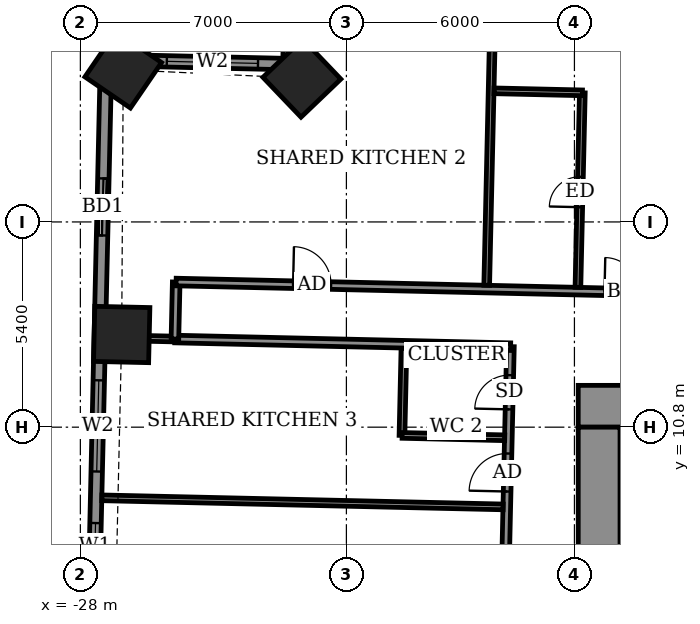
"""IFC4 building model, lengths in metres.
Left out: names, types, materials, properties, quantities, classifications, styles, units other than length and angle.
Written with IfcOpenShell. Run it as: python <this file> out.ifc"""

import sys

from ifc_helpers import new_model, si_unit, direction, frame, frame_2d, origin, origin_2d, place, context, subcontext, project, spatial, rectangle, extrude, element, fill, save


model = new_model("IFC4")
c1 = context("Model", 3, precision=1e-05, world=origin(), true_north=direction((0.0, 1.0)))
c2 = subcontext(c1, "Body", "Model", "MODEL_VIEW")
j1 = project(units=[si_unit("LENGTHUNIT", "METRE"), si_unit("PLANEANGLEUNIT", "RADIAN")], contexts=[c1])
p1 = place(None, origin())
s1 = spatial("IfcSite", under=j1, at=p1, CompositionType="ELEMENT")
p2 = place(p1, origin())
s2 = spatial("IfcBuilding", under=s1, at=p2, CompositionType="ELEMENT")
p3 = place(p2, frame((0.0, 0.0, 67.5)))
s3 = spatial("IfcBuildingStorey", under=s2, at=p3, CompositionType="ELEMENT", Elevation=67.5)
for number, where, z_axis, x_axis in (
    (1, (-22.171, 19.982, -0.55), (0.0, 0.0, 1.0), (-0.723, -0.691, 0.0)),
    (2, (-26.872, 20.205, -0.55), (0.0, 0.0, 1.0), (-0.565, -0.825, 0.0)),
    (3, (-26.912, 13.239, -0.55), (0.0, 0.0, 1.0), (-0.023, -1.0, 0.0)),
):
    element("IfcColumn", number, at=place(p3, frame(where, z_axis=z_axis, x_axis=x_axis)), inside=s3, PredefinedType="COLUMN", context=c2, shape_type="SweptSolid", body=[
        extrude(rectangle(XDim=1.45, YDim=1.45, at=origin_2d()), origin(), (0.0, 0.0, 1.0), 3.6),
    ])
p4 = place(p3, frame((-22.416, 25.152, 0.0), z_axis=(0.0, 0.0, 1.0), x_axis=(-0.022683280499, -0.999742701292, 0.0)))
e4 = element("IfcWall", 4, at=p4, inside=s3, PredefinedType="SOLIDWALL", context=c2, shape_type="SweptSolid", body=[
    extrude(rectangle(XDim=4.8, YDim=0.3, at=frame_2d((2.4, 0.0))), origin(), (0.0, 0.0, 1.0), 2.55),
])
p5 = place(p4, frame((1.598, 0.0, 0.9)))
e5 = element("IfcOpeningElement", 5, at=p5, cuts=e4, PredefinedType="OPENING", context=c2, shape_type="SweptSolid", body=[
    extrude(rectangle(XDim=2.4, YDim=1.5, at=frame_2d((1.2, 0.75))), frame((0.0, 0.16, 0.0), z_axis=(0.0, -1.0, 0.0), x_axis=(1.0, 0.0, 0.0)), (0.0, 0.0, 1.0), 0.32),
])
p6 = place(p3, frame((-22.525, 20.353, 0.0), z_axis=(0.0, 0.0, 1.0), x_axis=(-0.999742701292, 0.022683280499, 0.0)))
e6 = element("IfcWall", 6, at=p6, inside=s3, PredefinedType="SOLIDWALL", context=c2, shape_type="SweptSolid", body=[
    extrude(rectangle(XDim=4.8, YDim=0.3, at=frame_2d((2.4, 0.0))), origin(), (0.0, 0.0, 1.0), 2.55),
])
p7 = place(p6, frame((0.801, 0.0, 0.9)))
e7 = element("IfcOpeningElement", 7, at=p7, cuts=e6, PredefinedType="OPENING", context=c2, shape_type="SweptSolid", body=[
    extrude(rectangle(XDim=2.4, YDim=1.5, at=frame_2d((1.2, 0.75))), frame((0.0, 0.16, 0.0), z_axis=(0.0, -1.0, 0.0), x_axis=(1.0, 0.0, 0.0)), (0.0, 0.0, 1.0), 0.32),
])
p8 = place(p3, frame((-27.324, 20.462, 0.0), z_axis=(0.0, 0.0, 1.0), x_axis=(-0.022695628174, -0.999742421057, 0.0)))
e8 = element("IfcWall", 8, at=p8, inside=s3, PredefinedType="SOLIDWALL", context=c2, shape_type="SweptSolid", body=[
    extrude(rectangle(XDim=14.63, YDim=0.3, at=frame_2d((7.315, 0.0))), origin(), (0.0, 0.0, 1.0), 3.05),
])
p9 = place(p8, frame((3.118, 0.0, 0.0)))
e9 = element("IfcOpeningElement", 9, at=p9, cuts=e8, PredefinedType="OPENING", context=c2, shape_type="SweptSolid", body=[
    extrude(rectangle(XDim=1.5, YDim=2.4, at=frame_2d((0.75, 1.2))), frame((0.0, 0.16, 0.0), z_axis=(0.0, -1.0, 0.0), x_axis=(1.0, 0.0, 0.0)), (0.0, 0.0, 1.0), 0.32),
])
p10 = place(p8, frame((8.431, 0.0, 0.9)))
e10 = element("IfcOpeningElement", 10, at=p10, cuts=e8, PredefinedType="OPENING", context=c2, shape_type="SweptSolid", body=[
    extrude(rectangle(XDim=2.4, YDim=1.5, at=frame_2d((1.2, 0.75))), frame((0.0, 0.16, 0.0), z_axis=(0.0, -1.0, 0.0), x_axis=(1.0, 0.0, 0.0)), (0.0, 0.0, 1.0), 0.32),
])
p11 = place(p8, frame((12.188, 0.0, 0.9)))
e11 = element("IfcOpeningElement", 11, at=p11, cuts=e8, PredefinedType="OPENING", context=c2, shape_type="SweptSolid", body=[
    extrude(rectangle(XDim=1.2, YDim=1.5, at=frame_2d((0.6, 0.75))), frame((0.0, 0.16, 0.0), z_axis=(0.0, -1.0, 0.0), x_axis=(1.0, 0.0, 0.0)), (0.0, 0.0, 1.0), 0.32),
])
p12 = place(p3, frame((-17.287, -13.625, 0.0), z_axis=(0.0, 0.0, 1.0), x_axis=(0.022712214871, 0.999742044377, 0.0)))
e12 = element("IfcWall", 12, at=p12, inside=s3, PredefinedType="PARTITIONING", context=c2, shape_type="SweptSolid", body=[
    extrude(rectangle(XDim=26.551, YDim=0.2, at=frame_2d((13.275, 0.0))), origin(), (0.0, 0.0, 1.0), 3.05),
])
p13 = place(p12, frame((22.738, 0.0, 0.0)))
e13 = element("IfcOpeningElement", 13, at=p13, cuts=e12, PredefinedType="OPENING", context=c2, shape_type="SweptSolid", body=[
    extrude(rectangle(XDim=1.0, YDim=2.1, at=frame_2d((0.5, 1.05))), frame((0.0, 0.11, 0.0), z_axis=(0.0, -1.0, 0.0), x_axis=(1.0, 0.0, 0.0)), (0.0, 0.0, 1.0), 0.22),
])
p14 = place(p12, frame((24.9, 0.0, 0.0)))
e14 = element("IfcOpeningElement", 14, at=p14, cuts=e12, PredefinedType="OPENING", context=c2, shape_type="SweptSolid", body=[
    extrude(rectangle(XDim=0.9, YDim=2.1, at=frame_2d((0.45, 1.05))), frame((0.0, 0.11, 0.0), z_axis=(0.0, -1.0, 0.0), x_axis=(1.0, 0.0, 0.0)), (0.0, 0.0, 1.0), 0.22),
])
p15 = place(p12, frame((20.3, 0.0, 0.0)))
e15 = element("IfcOpeningElement", 15, at=p15, cuts=e12, PredefinedType="OPENING", context=c2, shape_type="SweptSolid", body=[
    extrude(rectangle(XDim=1.0, YDim=2.1, at=frame_2d((0.5, 1.05))), frame((0.0, 0.11, 0.0), z_axis=(0.0, -1.0, 0.0), x_axis=(1.0, 0.0, 0.0)), (0.0, 0.0, 1.0), 0.22),
])
p16 = place(p12, frame((15.025, 0.0, 0.0)))
e16 = element("IfcOpeningElement", 16, at=p16, cuts=e12, PredefinedType="OPENING", context=c2, shape_type="SweptSolid", body=[
    extrude(rectangle(XDim=1.0, YDim=2.1, at=frame_2d((0.5, 1.05))), frame((0.0, 0.11, 0.0), z_axis=(0.0, -1.0, 0.0), x_axis=(1.0, 0.0, 0.0)), (0.0, 0.0, 1.0), 0.22),
])
p17 = place(p12, frame((17.525, 0.0, 0.0)))
e17 = element("IfcOpeningElement", 17, at=p17, cuts=e12, PredefinedType="OPENING", context=c2, shape_type="SweptSolid", body=[
    extrude(rectangle(XDim=0.9, YDim=2.1, at=frame_2d((0.45, 1.05))), frame((0.0, 0.11, 0.0), z_axis=(0.0, -1.0, 0.0), x_axis=(1.0, 0.0, 0.0)), (0.0, 0.0, 1.0), 0.22),
])
p18 = place(p12, frame((11.678, 0.0, 0.0)))
e18 = element("IfcOpeningElement", 18, at=p18, cuts=e12, PredefinedType="OPENING", context=c2, shape_type="SweptSolid", body=[
    extrude(rectangle(XDim=1.0, YDim=2.1, at=frame_2d((0.5, 1.05))), frame((0.0, 0.11, 0.0), z_axis=(0.0, -1.0, 0.0), x_axis=(1.0, 0.0, 0.0)), (0.0, 0.0, 1.0), 0.22),
])
p19 = place(p12, frame((8.45, 0.0, 0.0)))
e19 = element("IfcOpeningElement", 19, at=p19, cuts=e12, PredefinedType="OPENING", context=c2, shape_type="SweptSolid", body=[
    extrude(rectangle(XDim=1.0, YDim=2.1, at=frame_2d((0.5, 1.05))), frame((0.0, 0.11, 0.0), z_axis=(0.0, -1.0, 0.0), x_axis=(1.0, 0.0, 0.0)), (0.0, 0.0, 1.0), 0.22),
])
p20 = place(p12, frame((6.275, 0.0, 0.0)))
e20 = element("IfcOpeningElement", 20, at=p20, cuts=e12, PredefinedType="OPENING", context=c2, shape_type="SweptSolid", body=[
    extrude(rectangle(XDim=0.9, YDim=2.1, at=frame_2d((0.45, 1.05))), frame((0.0, 0.11, 0.0), z_axis=(0.0, -1.0, 0.0), x_axis=(1.0, 0.0, 0.0)), (0.0, 0.0, 1.0), 0.22),
])
p21 = place(p12, frame((1.062, 0.0, 0.0)))
e21 = element("IfcOpeningElement", 21, at=p21, cuts=e12, PredefinedType="OPENING", context=c2, shape_type="SweptSolid", body=[
    extrude(rectangle(XDim=1.0, YDim=2.1, at=frame_2d((0.5, 1.05))), frame((0.0, 0.11, 0.0), z_axis=(0.0, -1.0, 0.0), x_axis=(1.0, 0.0, 0.0)), (0.0, 0.0, 1.0), 0.22),
])
p22 = place(p12, frame((3.875, 0.0, 0.0)))
e22 = element("IfcOpeningElement", 22, at=p22, cuts=e12, PredefinedType="OPENING", context=c2, shape_type="SweptSolid", body=[
    extrude(rectangle(XDim=0.9, YDim=2.1, at=frame_2d((0.45, 1.05))), frame((0.0, 0.11, 0.0), z_axis=(0.0, -1.0, 0.0), x_axis=(1.0, 0.0, 0.0)), (0.0, 0.0, 1.0), 0.22),
])
p23 = place(p3, frame((-27.435, 8.941, 0.0), z_axis=(0.0, 0.0, 1.0), x_axis=(0.999743955169, -0.022627949603, 0.0)))
e23 = element("IfcWall", 23, at=p23, inside=s3, PredefinedType="PARTITIONING", context=c2, shape_type="SweptSolid", body=[
    extrude(rectangle(XDim=10.563, YDim=0.15, at=frame_2d((5.281, 0.0))), origin(), (0.0, 0.0, 1.0), 2.55),
])
p24 = place(p3, frame((-19.538, 10.583, 0.0), z_axis=(0.0, 0.0, 1.0), x_axis=(0.022612884682, 0.999744296031, 0.0)))
e24 = element("IfcWall", 24, at=p24, inside=s3, PredefinedType="PARTITIONING", context=c2, shape_type="SweptSolid", body=[
    extrude(rectangle(XDim=2.3, YDim=0.15, at=frame_2d((1.15, 0.0))), origin(), (0.0, 0.0, 1.0), 3.05),
])
p25 = place(p3, frame((-19.533, 10.583, 0.0), z_axis=(0.0, 0.0, 1.0), x_axis=(0.999736155505, -0.022969966847, 0.0)))
e25 = element("IfcWall", 25, at=p25, inside=s3, PredefinedType="PARTITIONING", context=c2, shape_type="SweptSolid", body=[
    extrude(rectangle(XDim=2.7, YDim=0.15, at=frame_2d((1.35, 0.0))), origin(), (0.0, 0.0, 1.0), 3.05),
])
p26 = place(p3, frame((-27.34, 13.16, 0.0), z_axis=(0.0, 0.0, 1.0), x_axis=(0.999748678707, -0.022418283238, 0.0)))
e26 = element("IfcWall", 26, at=p26, inside=s3, PredefinedType="PARTITIONING", context=c2, shape_type="SweptSolid", body=[
    extrude(rectangle(XDim=1.83, YDim=0.15, at=frame_2d((0.915, 0.0))), origin(), (0.0, 0.0, 1.0), 3.05),
])
p27 = place(p3, frame((-25.515, 13.119, 0.0), z_axis=(0.0, 0.0, 1.0), x_axis=(0.999741550249, -0.022733954903, 0.0)))
e27 = element("IfcWall", 27, at=p27, inside=s3, PredefinedType="PARTITIONING", context=c2, shape_type="SweptSolid", body=[
    extrude(rectangle(XDim=8.838, YDim=0.2, at=frame_2d((4.419, 0.0))), origin(), (0.0, 0.0, 1.0), 3.05),
])
p28 = place(p3, frame((-25.512, 13.119, 0.0), z_axis=(0.0, 0.0, 1.0), x_axis=(0.022617910375, 0.999744182344, 0.0)))
e28 = element("IfcWall", 28, at=p28, inside=s3, PredefinedType="PARTITIONING", context=c2, shape_type="SweptSolid", body=[
    extrude(rectangle(XDim=1.5, YDim=0.2, at=frame_2d((0.75, 0.0))), origin(), (0.0, 0.0, 1.0), 3.05),
])
p29 = place(p3, frame((-25.481, 14.619, 0.0), z_axis=(0.0, 0.0, 1.0), x_axis=(0.999742349682, -0.022698772048, 0.0)))
e29 = element("IfcWall", 29, at=p29, inside=s3, PredefinedType="PARTITIONING", context=c2, shape_type="SweptSolid", body=[
    extrude(rectangle(XDim=54.886, YDim=0.2, at=frame_2d((27.443, 0.0))), origin(), (0.0, 0.0, 1.0), 3.05),
])
p30 = place(p29, frame((52.093, 0.0, 0.0)))
e30 = element("IfcOpeningElement", 30, at=p30, cuts=e29, PredefinedType="OPENING", context=c2, shape_type="SweptSolid", body=[
    extrude(rectangle(XDim=1.0, YDim=2.1, at=frame_2d((0.5, 1.05))), frame((0.0, 0.11, 0.0), z_axis=(0.0, -1.0, 0.0), x_axis=(1.0, 0.0, 0.0)), (0.0, 0.0, 1.0), 0.22),
])
p31 = place(p29, frame((46.325, 0.0, 0.0)))
e31 = element("IfcOpeningElement", 31, at=p31, cuts=e29, PredefinedType="OPENING", context=c2, shape_type="SweptSolid", body=[
    extrude(rectangle(XDim=0.9, YDim=2.1, at=frame_2d((0.45, 1.05))), frame((0.0, 0.11, 0.0), z_axis=(0.0, -1.0, 0.0), x_axis=(1.0, 0.0, 0.0)), (0.0, 0.0, 1.0), 0.22),
])
p32 = place(p29, frame((41.275, 0.0, 0.0)))
e32 = element("IfcOpeningElement", 32, at=p32, cuts=e29, PredefinedType="OPENING", context=c2, shape_type="SweptSolid", body=[
    extrude(rectangle(XDim=0.9, YDim=2.1, at=frame_2d((0.45, 1.05))), frame((0.0, 0.11, 0.0), z_axis=(0.0, -1.0, 0.0), x_axis=(1.0, 0.0, 0.0)), (0.0, 0.0, 1.0), 0.22),
])
p33 = place(p29, frame((38.875, 0.0, 0.0)))
e33 = element("IfcOpeningElement", 33, at=p33, cuts=e29, PredefinedType="OPENING", context=c2, shape_type="SweptSolid", body=[
    extrude(rectangle(XDim=0.9, YDim=2.1, at=frame_2d((0.45, 1.05))), frame((0.0, 0.11, 0.0), z_axis=(0.0, -1.0, 0.0), x_axis=(1.0, 0.0, 0.0)), (0.0, 0.0, 1.0), 0.22),
])
p34 = place(p29, frame((31.95, 0.0, 0.0)))
e34 = element("IfcOpeningElement", 34, at=p34, cuts=e29, PredefinedType="OPENING", context=c2, shape_type="SweptSolid", body=[
    extrude(rectangle(XDim=0.9, YDim=2.1, at=frame_2d((0.45, 1.05))), frame((0.0, 0.11, 0.0), z_axis=(0.0, -1.0, 0.0), x_axis=(1.0, 0.0, 0.0)), (0.0, 0.0, 1.0), 0.22),
])
p35 = place(p29, frame((29.8, 0.0, 0.0)))
e35 = element("IfcOpeningElement", 35, at=p35, cuts=e29, PredefinedType="OPENING", context=c2, shape_type="SweptSolid", body=[
    extrude(rectangle(XDim=0.9, YDim=2.1, at=frame_2d((0.45, 1.05))), frame((0.0, 0.11, 0.0), z_axis=(0.0, -1.0, 0.0), x_axis=(1.0, 0.0, 0.0)), (0.0, 0.0, 1.0), 0.22),
])
p36 = place(p29, frame((22.875, 0.0, 0.0)))
e36 = element("IfcOpeningElement", 36, at=p36, cuts=e29, PredefinedType="OPENING", context=c2, shape_type="SweptSolid", body=[
    extrude(rectangle(XDim=0.9, YDim=2.1, at=frame_2d((0.45, 1.05))), frame((0.0, 0.11, 0.0), z_axis=(0.0, -1.0, 0.0), x_axis=(1.0, 0.0, 0.0)), (0.0, 0.0, 1.0), 0.22),
])
p37 = place(p29, frame((20.675, 0.0, 0.0)))
e37 = element("IfcOpeningElement", 37, at=p37, cuts=e29, PredefinedType="OPENING", context=c2, shape_type="SweptSolid", body=[
    extrude(rectangle(XDim=0.9, YDim=2.1, at=frame_2d((0.45, 1.05))), frame((0.0, 0.11, 0.0), z_axis=(0.0, -1.0, 0.0), x_axis=(1.0, 0.0, 0.0)), (0.0, 0.0, 1.0), 0.22),
])
p38 = place(p29, frame((13.525, 0.0, 0.0)))
e38 = element("IfcOpeningElement", 38, at=p38, cuts=e29, PredefinedType="OPENING", context=c2, shape_type="SweptSolid", body=[
    extrude(rectangle(XDim=0.9, YDim=2.1, at=frame_2d((0.45, 1.05))), frame((0.0, 0.11, 0.0), z_axis=(0.0, -1.0, 0.0), x_axis=(1.0, 0.0, 0.0)), (0.0, 0.0, 1.0), 0.22),
])
p39 = place(p29, frame((11.275, 0.0, 0.0)))
e39 = element("IfcOpeningElement", 39, at=p39, cuts=e29, PredefinedType="OPENING", context=c2, shape_type="SweptSolid", body=[
    extrude(rectangle(XDim=0.9, YDim=2.1, at=frame_2d((0.45, 1.05))), frame((0.0, 0.11, 0.0), z_axis=(0.0, -1.0, 0.0), x_axis=(1.0, 0.0, 0.0)), (0.0, 0.0, 1.0), 0.22),
])
p40 = place(p29, frame((3.079, 0.0, 0.0)))
e40 = element("IfcOpeningElement", 40, at=p40, cuts=e29, PredefinedType="OPENING", context=c2, shape_type="SweptSolid", body=[
    extrude(rectangle(XDim=1.0, YDim=2.1, at=frame_2d((0.5, 1.05))), frame((0.0, 0.11, 0.0), z_axis=(0.0, -1.0, 0.0), x_axis=(1.0, 0.0, 0.0)), (0.0, 0.0, 1.0), 0.22),
])
p41 = place(p3, frame((-17.308, 14.533, 0.0), z_axis=(0.0, 0.0, 1.0), x_axis=(0.022713904397, 0.999742005993, 0.0)))
e41 = element("IfcWall", 41, at=p41, inside=s3, PredefinedType="PARTITIONING", context=c2, shape_type="SweptSolid", body=[
    extrude(rectangle(XDim=10.351, YDim=0.15, at=frame_2d((5.175, 0.0))), origin(), (0.0, 0.0, 1.0), 2.55),
])
p42 = place(p3, frame((-14.908, 14.479, 0.0), z_axis=(0.0, 0.0, 1.0), x_axis=(0.02265315592, 0.999743384338, 0.0)))
e42 = element("IfcWall", 42, at=p42, inside=s3, PredefinedType="PARTITIONING", context=c2, shape_type="SweptSolid", body=[
    extrude(rectangle(XDim=5.119, YDim=0.15, at=frame_2d((2.56, 0.0))), origin(), (0.0, 0.0, 1.0), 3.05),
])
p43 = place(p42, frame((2.11, 0.0, 0.0)))
e43 = element("IfcOpeningElement", 43, at=p43, cuts=e42, PredefinedType="OPENING", context=c2, shape_type="SweptSolid", body=[
    extrude(rectangle(XDim=0.8, YDim=2.1, at=frame_2d((0.4, 1.05))), frame((0.0, 0.085, 0.0), z_axis=(0.0, -1.0, 0.0), x_axis=(1.0, 0.0, 0.0)), (0.0, 0.0, 1.0), 0.17),
])
p44 = place(p3, frame((-17.115, 19.65, 0.0), z_axis=(0.0, 0.0, 1.0), x_axis=(0.999740478815, -0.022781023197, 0.0)))
e44 = element("IfcWall", 44, at=p44, inside=s3, PredefinedType="PARTITIONING", context=c2, shape_type="SweptSolid", body=[
    extrude(rectangle(XDim=2.325, YDim=0.15, at=frame_2d((1.163, 0.0))), origin(), (0.0, 0.0, 1.0), 3.05),
])
p45 = place(p3, frame((-14.9, 11.35, 0.0), z_axis=(0.0, 0.0, 1.0), x_axis=(1.0, 0.0, 0.0)))
e45 = element("IfcWall", 45, at=p45, inside=s3, PredefinedType="SHEAR", context=c2, shape_type="SweptSolid", body=[
    extrude(rectangle(XDim=29.8, YDim=1.1, at=frame_2d((14.9, 0.0))), origin(), (0.0, 0.0, 1.0), 3.6),
])
p46 = place(p3, frame((-14.35, -10.8, 0.0), z_axis=(0.0, 0.0, 1.0), x_axis=(0.0, 1.0, 0.0)))
e46 = element("IfcWall", 46, at=p46, inside=s3, PredefinedType="SHEAR", context=c2, shape_type="SweptSolid", body=[
    extrude(rectangle(XDim=21.6, YDim=1.1, at=frame_2d((10.8, 0.0))), origin(), (0.0, 0.0, 1.0), 3.6),
])
p47 = place(p46, frame((8.25, 0.0, 0.0)))
e47 = element("IfcOpeningElement", 47, at=p47, cuts=e46, PredefinedType="OPENING", context=c2, shape_type="SweptSolid", body=[
    extrude(rectangle(XDim=1.2, YDim=2.1, at=frame_2d((0.6, 1.05))), frame((0.0, 0.56, 0.0), z_axis=(0.0, -1.0, 0.0), x_axis=(1.0, 0.0, 0.0)), (0.0, 0.0, 1.0), 1.12),
])
p48 = place(p46, frame((15.25, 0.0, 0.0)))
e48 = element("IfcOpeningElement", 48, at=p48, cuts=e46, PredefinedType="OPENING", context=c2, shape_type="SweptSolid", body=[
    extrude(rectangle(XDim=1.2, YDim=2.1, at=frame_2d((0.6, 1.05))), frame((0.0, 0.56, 0.0), z_axis=(0.0, -1.0, 0.0), x_axis=(1.0, 0.0, 0.0)), (0.0, 0.0, 1.0), 1.12),
])
p49 = place(p7, origin())
e49 = element("IfcWindow", 49, at=p49, inside=s3, PartitioningType="DOUBLE_PANEL_VERTICAL", PredefinedType="WINDOW", context=c2, shape_type="SweptSolid", body=[
    extrude(rectangle(XDim=2.4, YDim=1.5, at=frame_2d((1.2, 0.75))), frame((0.0, 0.03, 0.0), z_axis=(0.0, -1.0, 0.0), x_axis=(1.0, 0.0, 0.0)), (0.0, 0.0, 1.0), 0.06),
])
fill(e7, e49)
p50 = place(p9, origin())
e50 = element("IfcDoor", 50, at=p50, inside=s3, OperationType="SLIDING_TO_LEFT", PredefinedType="DOOR", context=c2, shape_type="SweptSolid", body=[
    extrude(rectangle(XDim=1.5, YDim=2.4, at=frame_2d((0.75, 1.2))), frame((0.0, 0.025, 0.0), z_axis=(0.0, -1.0, 0.0), x_axis=(1.0, 0.0, 0.0)), (0.0, 0.0, 1.0), 0.05),
])
fill(e9, e50)
p51 = place(p10, origin())
e51 = element("IfcWindow", 51, at=p51, inside=s3, PartitioningType="DOUBLE_PANEL_VERTICAL", PredefinedType="WINDOW", context=c2, shape_type="SweptSolid", body=[
    extrude(rectangle(XDim=2.4, YDim=1.5, at=frame_2d((1.2, 0.75))), frame((0.0, 0.03, 0.0), z_axis=(0.0, -1.0, 0.0), x_axis=(1.0, 0.0, 0.0)), (0.0, 0.0, 1.0), 0.06),
])
fill(e10, e51)
p52 = place(p11, origin())
e52 = element("IfcWindow", 52, at=p52, inside=s3, PartitioningType="SINGLE_PANEL", PredefinedType="WINDOW", context=c2, shape_type="SweptSolid", body=[
    extrude(rectangle(XDim=1.2, YDim=1.5, at=frame_2d((0.6, 0.75))), frame((0.0, 0.03, 0.0), z_axis=(0.0, -1.0, 0.0), x_axis=(1.0, 0.0, 0.0)), (0.0, 0.0, 1.0), 0.06),
])
fill(e11, e52)
p53 = place(p39, origin())
e53 = element("IfcDoor", 53, at=p53, inside=s3, OperationType="SINGLE_SWING_LEFT", PredefinedType="DOOR", context=c2, shape_type="SweptSolid", body=[
    extrude(rectangle(XDim=0.9, YDim=2.1, at=frame_2d((0.45, 1.05))), frame((0.0, 0.025, 0.0), z_axis=(0.0, -1.0, 0.0), x_axis=(1.0, 0.0, 0.0)), (0.0, 0.0, 1.0), 0.05),
])
fill(e39, e53)
p54 = place(p43, origin())
e54 = element("IfcDoor", 54, at=p54, inside=s3, OperationType="SINGLE_SWING_LEFT", PredefinedType="DOOR", context=c2, shape_type="SweptSolid", body=[
    extrude(rectangle(XDim=0.8, YDim=2.1, at=frame_2d((0.4, 1.05))), frame((0.0, 0.025, 0.0), z_axis=(0.0, -1.0, 0.0), x_axis=(1.0, 0.0, 0.0)), (0.0, 0.0, 1.0), 0.05),
])
fill(e43, e54)
p55 = place(p40, origin())
e55 = element("IfcDoor", 55, at=p55, inside=s3, OperationType="SINGLE_SWING_RIGHT", PredefinedType="DOOR", context=c2, shape_type="SweptSolid", body=[
    extrude(rectangle(XDim=1.0, YDim=2.1, at=frame_2d((0.5, 1.05))), frame((0.0, 0.025, 0.0), z_axis=(0.0, -1.0, 0.0), x_axis=(1.0, 0.0, 0.0)), (0.0, 0.0, 1.0), 0.05),
])
fill(e40, e55)
p56 = place(p13, origin())
e56 = element("IfcDoor", 56, at=p56, inside=s3, OperationType="SINGLE_SWING_LEFT", PredefinedType="DOOR", context=c2, shape_type="SweptSolid", body=[
    extrude(rectangle(XDim=1.0, YDim=2.1, at=frame_2d((0.5, 1.05))), frame((0.0, 0.025, 0.0), z_axis=(0.0, -1.0, 0.0), x_axis=(1.0, 0.0, 0.0)), (0.0, 0.0, 1.0), 0.05),
])
fill(e13, e56)
p57 = place(p14, origin())
e57 = element("IfcDoor", 57, at=p57, inside=s3, OperationType="SINGLE_SWING_LEFT", PredefinedType="DOOR", context=c2, shape_type="SweptSolid", body=[
    extrude(rectangle(XDim=0.9, YDim=2.1, at=frame_2d((0.45, 1.05))), frame((0.0, 0.025, 0.0), z_axis=(0.0, -1.0, 0.0), x_axis=(1.0, 0.0, 0.0)), (0.0, 0.0, 1.0), 0.05),
])
fill(e14, e57)
save(model, sys.argv[1])
